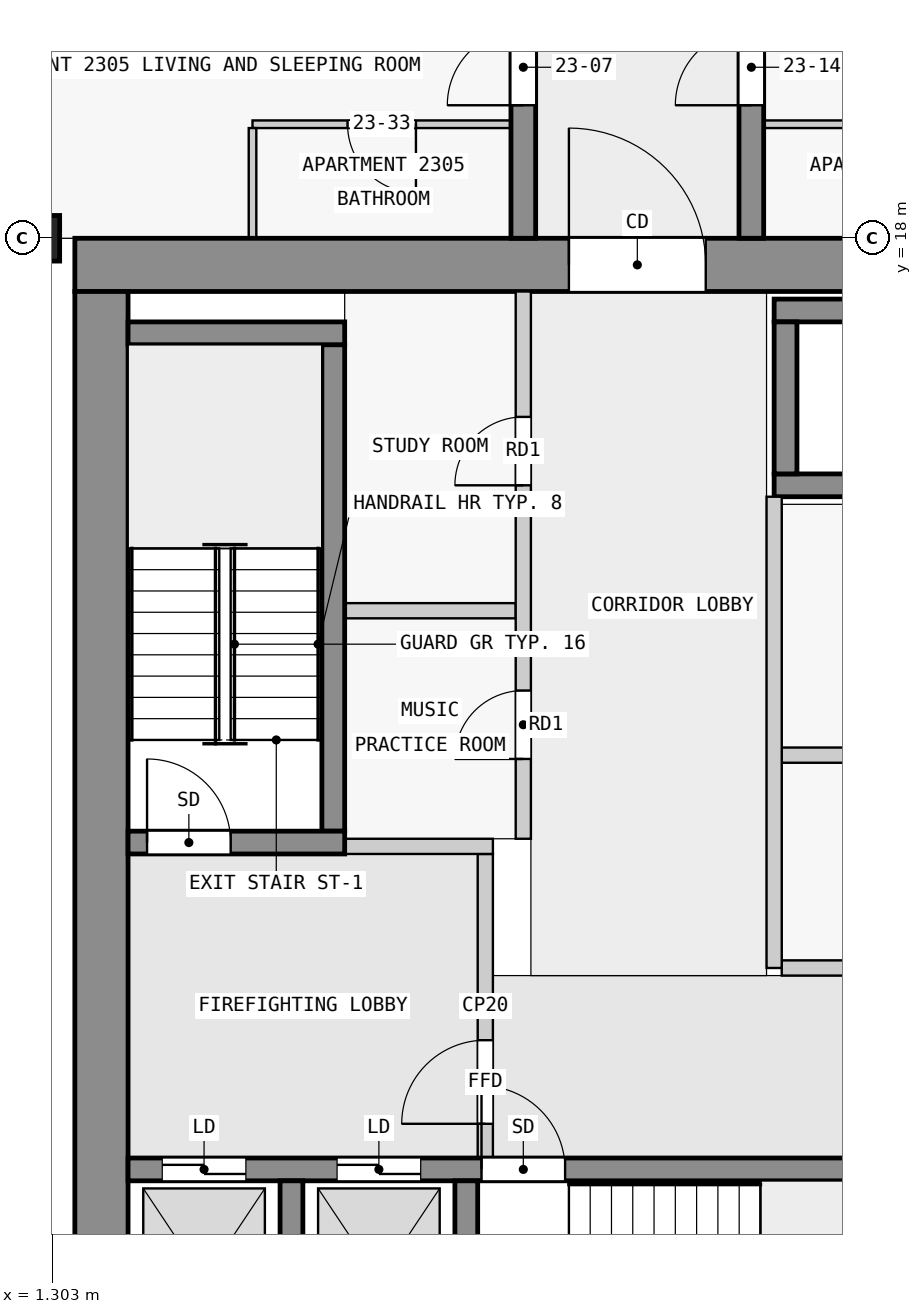
"""IFC4 building model, lengths in metres.
Left out: names, types, materials, properties, quantities, classifications, styles, units other than length and angle.
Written with IfcOpenShell. Run it as: python <this file> out.ifc"""

import sys

from ifc_helpers import new_model, si_unit, direction, frame, frame_2d, origin, origin_2d, place, context, subcontext, project, spatial, rectangle, extrude, element, fill, save


model = new_model("IFC4")
c1 = context("Model", 3, precision=1e-05, world=origin(), true_north=direction((0.0, 1.0)))
c2 = subcontext(c1, "Body", "Model", "MODEL_VIEW")
j1 = project(units=[si_unit("LENGTHUNIT", "METRE"), si_unit("PLANEANGLEUNIT", "RADIAN")], contexts=[c1])
p1 = place(None, origin())
s1 = spatial("IfcSite", under=j1, at=p1, CompositionType="ELEMENT")
p2 = place(p1, origin())
s2 = spatial("IfcBuilding", under=s1, at=p2, CompositionType="ELEMENT")
p3 = place(p2, frame((0.0, 0.0, 92.3)))
s3 = spatial("IfcBuildingStorey", under=s2, at=p3, CompositionType="ELEMENT", Elevation=92.3)
p4 = place(p3, frame((0.7, 18.0, 0.0), z_axis=(0.0, 0.0, 1.0), x_axis=(0.0, 1.0, 0.0)))
e1 = element("IfcColumn", 1, at=p4, inside=s3, PredefinedType="COLUMN", context=c2, shape_type="SweptSolid", body=[
    extrude(rectangle(XDim=0.6, YDim=1.4, at=origin_2d()), origin(), (0.0, 0.0, 1.0), 3.5),
])
p5 = place(p3, frame((1.6, 17.65, 0.0), z_axis=(0.0, 0.0, 1.0), x_axis=(1.0, 0.0, 0.0)))
e2 = element("IfcWall", 2, at=p5, inside=s3, PredefinedType="SHEAR", context=c2, shape_type="SweptSolid", body=[
    extrude(rectangle(XDim=20.9, YDim=0.7, at=frame_2d((10.45, 0.0))), origin(), (0.0, 0.0, 1.0), 3.25),
])
p6 = place(p5, frame((6.5, 0.0, 0.0)))
e3 = element("IfcOpeningElement", 3, at=p6, cuts=e2, PredefinedType="OPENING", context=c2, shape_type="SweptSolid", body=[
    extrude(rectangle(XDim=1.8, YDim=2.1, at=frame_2d((0.9, 1.05))), frame((0.0, 0.36, 0.0), z_axis=(0.0, -1.0, 0.0), x_axis=(1.0, 0.0, 0.0)), (0.0, 0.0, 1.0), 0.72),
])
p7 = place(p3, frame((1.95, 2.5, 0.0), z_axis=(0.0, 0.0, 1.0), x_axis=(0.0, 1.0, 0.0)))
e4 = element("IfcWall", 4, at=p7, inside=s3, PredefinedType="SHEAR", context=c2, shape_type="SweptSolid", body=[
    extrude(rectangle(XDim=14.8, YDim=0.7, at=frame_2d((7.4, 0.0))), origin(), (0.0, 0.0, 1.0), 3.25),
])
for number, where, z_axis, x_axis in (
    (5, (4.45, 2.8, 0.0), (0.0, 0.0, 1.0), (0.0, 1.0, 0.0)),
    (6, (6.75, 2.8, 0.0), (0.0, 0.0, 1.0), (0.0, 1.0, 0.0)),
):
    element("IfcWall", number, at=place(p3, frame(where, z_axis=z_axis, x_axis=x_axis)), inside=s3, PredefinedType="SHEAR", context=c2, shape_type="SweptSolid", body=[
        extrude(rectangle(XDim=2.8, YDim=0.3, at=frame_2d((1.4, 0.0))), origin(), (0.0, 0.0, 1.0), 3.25),
    ])
p8 = place(p3, frame((2.3, 5.75, 0.0), z_axis=(0.0, 0.0, 1.0), x_axis=(1.0, 0.0, 0.0)))
e7 = element("IfcWall", 7, at=p8, inside=s3, PredefinedType="SHEAR", context=c2, shape_type="SweptSolid", body=[
    extrude(rectangle(XDim=18.8, YDim=0.3, at=frame_2d((9.4, 0.0))), origin(), (0.0, 0.0, 1.0), 3.25),
])
p9 = place(p8, frame((4.65, 0.0, 0.0)))
e8 = element("IfcOpeningElement", 8, at=p9, cuts=e7, PredefinedType="OPENING", context=c2, shape_type="SweptSolid", body=[
    extrude(rectangle(XDim=1.1, YDim=2.1, at=frame_2d((0.55, 1.05))), frame((0.0, 0.16, 0.0), z_axis=(0.0, -1.0, 0.0), x_axis=(1.0, 0.0, 0.0)), (0.0, 0.0, 1.0), 0.32),
])
p10 = place(p8, frame((0.45, 0.0, 0.0)))
e9 = element("IfcOpeningElement", 9, at=p10, cuts=e7, PredefinedType="OPENING", context=c2, shape_type="SweptSolid", body=[
    extrude(rectangle(XDim=1.1, YDim=2.1, at=frame_2d((0.55, 1.05))), frame((0.0, 0.16, 0.0), z_axis=(0.0, -1.0, 0.0), x_axis=(1.0, 0.0, 0.0)), (0.0, 0.0, 1.0), 0.32),
])
p11 = place(p8, frame((2.75, 0.0, 0.0)))
e10 = element("IfcOpeningElement", 10, at=p11, cuts=e7, PredefinedType="OPENING", context=c2, shape_type="SweptSolid", body=[
    extrude(rectangle(XDim=1.1, YDim=2.1, at=frame_2d((0.55, 1.05))), frame((0.0, 0.16, 0.0), z_axis=(0.0, -1.0, 0.0), x_axis=(1.0, 0.0, 0.0)), (0.0, 0.0, 1.0), 0.32),
])
p12 = place(p8, frame((11.85, 0.0, 0.0)))
e11 = element("IfcOpeningElement", 11, at=p12, cuts=e7, PredefinedType="OPENING", context=c2, shape_type="SweptSolid", body=[
    extrude(rectangle(XDim=1.1, YDim=2.1, at=frame_2d((0.55, 1.05))), frame((0.0, 0.16, 0.0), z_axis=(0.0, -1.0, 0.0), x_axis=(1.0, 0.0, 0.0)), (0.0, 0.0, 1.0), 0.32),
])
p13 = place(p8, frame((14.35, 0.0, 0.0)))
e12 = element("IfcOpeningElement", 12, at=p13, cuts=e7, PredefinedType="OPENING", context=c2, shape_type="SweptSolid", body=[
    extrude(rectangle(XDim=1.1, YDim=2.1, at=frame_2d((0.55, 1.05))), frame((0.0, 0.16, 0.0), z_axis=(0.0, -1.0, 0.0), x_axis=(1.0, 0.0, 0.0)), (0.0, 0.0, 1.0), 0.32),
])
p14 = place(p8, frame((16.85, 0.0, 0.0)))
e13 = element("IfcOpeningElement", 13, at=p14, cuts=e7, PredefinedType="OPENING", context=c2, shape_type="SweptSolid", body=[
    extrude(rectangle(XDim=1.1, YDim=2.1, at=frame_2d((0.55, 1.05))), frame((0.0, 0.16, 0.0), z_axis=(0.0, -1.0, 0.0), x_axis=(1.0, 0.0, 0.0)), (0.0, 0.0, 1.0), 0.32),
])
p15 = place(p3, frame((2.3, 10.05, 0.0), z_axis=(0.0, 0.0, 1.0), x_axis=(1.0, 0.0, 0.0)))
e14 = element("IfcWall", 14, at=p15, inside=s3, PredefinedType="SHEAR", context=c2, shape_type="SweptSolid", body=[
    extrude(rectangle(XDim=2.85, YDim=0.3, at=frame_2d((1.425, 0.0))), origin(), (0.0, 0.0, 1.0), 3.25),
])
p16 = place(p15, frame((0.25, 0.0, 0.0)))
e15 = element("IfcOpeningElement", 15, at=p16, cuts=e14, PredefinedType="OPENING", context=c2, shape_type="SweptSolid", body=[
    extrude(rectangle(XDim=1.1, YDim=2.1, at=frame_2d((0.55, 1.05))), frame((0.0, 0.16, 0.0), z_axis=(0.0, -1.0, 0.0), x_axis=(1.0, 0.0, 0.0)), (0.0, 0.0, 1.0), 0.32),
])
p17 = place(p3, frame((5.0, 10.2, 0.0), z_axis=(0.0, 0.0, 1.0), x_axis=(0.0, 1.0, 0.0)))
e16 = element("IfcWall", 16, at=p17, inside=s3, PredefinedType="SHEAR", context=c2, shape_type="SweptSolid", body=[
    extrude(rectangle(XDim=6.4, YDim=0.3, at=frame_2d((3.2, 0.0))), origin(), (0.0, 0.0, 1.0), 3.25),
])
p18 = place(p3, frame((2.3, 16.75, 0.0), z_axis=(0.0, 0.0, 1.0), x_axis=(1.0, 0.0, 0.0)))
e17 = element("IfcWall", 17, at=p18, inside=s3, PredefinedType="SHEAR", context=c2, shape_type="SweptSolid", body=[
    extrude(rectangle(XDim=2.85, YDim=0.3, at=frame_2d((1.425, 0.0))), origin(), (0.0, 0.0, 1.0), 3.25),
])
for number, where, z_axis, x_axis in (
    (18, (10.8, 17.05, 0.0), (0.0, 0.0, 1.0), (1.0, 0.0, 0.0)),
    (19, (10.8, 14.75, 0.0), (0.0, 0.0, 1.0), (1.0, 0.0, 0.0)),
):
    element("IfcWall", number, at=place(p3, frame(where, z_axis=z_axis, x_axis=x_axis)), inside=s3, PredefinedType="SHEAR", context=c2, shape_type="SweptSolid", body=[
        extrude(rectangle(XDim=7.8, YDim=0.3, at=frame_2d((3.9, 0.0))), origin(), (0.0, 0.0, 1.0), 3.25),
    ])
p19 = place(p3, frame((10.95, 14.9, 0.0), z_axis=(0.0, 0.0, 1.0), x_axis=(0.0, 1.0, 0.0)))
e20 = element("IfcWall", 20, at=p19, inside=s3, PredefinedType="SHEAR", context=c2, shape_type="SweptSolid", body=[
    extrude(rectangle(XDim=2.0, YDim=0.3, at=frame_2d((1.0, 0.0))), origin(), (0.0, 0.0, 1.0), 3.25),
])
p20 = place(p3, frame((7.5, 18.0, 0.0), z_axis=(0.0, 0.0, 1.0), x_axis=(0.0, 1.0, 0.0)))
e21 = element("IfcWall", 21, at=p20, inside=s3, PredefinedType="SHEAR", context=c2, shape_type="SweptSolid", body=[
    extrude(rectangle(XDim=27.0, YDim=0.325, at=frame_2d((13.5, 0.0))), origin(), (0.0, 0.0, 1.0), 3.25),
])
p21 = place(p20, frame((1.75, 0.0, 0.0)))
e22 = element("IfcOpeningElement", 22, at=p21, cuts=e21, PredefinedType="OPENING", context=c2, shape_type="SweptSolid", body=[
    extrude(rectangle(XDim=1.0, YDim=2.1, at=frame_2d((0.5, 1.05))), frame((0.0, 0.172, 0.0), z_axis=(0.0, -1.0, 0.0), x_axis=(1.0, 0.0, 0.0)), (0.0, 0.0, 1.0), 0.345),
])
p22 = place(p20, frame((6.25, 0.0, 0.0)))
e23 = element("IfcOpeningElement", 23, at=p22, cuts=e21, PredefinedType="OPENING", context=c2, shape_type="SweptSolid", body=[
    extrude(rectangle(XDim=1.0, YDim=2.1, at=frame_2d((0.5, 1.05))), frame((0.0, 0.172, 0.0), z_axis=(0.0, -1.0, 0.0), x_axis=(1.0, 0.0, 0.0)), (0.0, 0.0, 1.0), 0.345),
])
p23 = place(p20, frame((10.85, 0.0, 0.0)))
e24 = element("IfcOpeningElement", 24, at=p23, cuts=e21, PredefinedType="OPENING", context=c2, shape_type="SweptSolid", body=[
    extrude(rectangle(XDim=0.9, YDim=2.1, at=frame_2d((0.45, 1.05))), frame((0.0, 0.172, 0.0), z_axis=(0.0, -1.0, 0.0), x_axis=(1.0, 0.0, 0.0)), (0.0, 0.0, 1.0), 0.345),
])
p24 = place(p20, frame((15.25, 0.0, 0.0)))
e25 = element("IfcOpeningElement", 25, at=p24, cuts=e21, PredefinedType="OPENING", context=c2, shape_type="SweptSolid", body=[
    extrude(rectangle(XDim=1.0, YDim=2.1, at=frame_2d((0.5, 1.05))), frame((0.0, 0.172, 0.0), z_axis=(0.0, -1.0, 0.0), x_axis=(1.0, 0.0, 0.0)), (0.0, 0.0, 1.0), 0.345),
])
p25 = place(p20, frame((19.85, 0.0, 0.0)))
e26 = element("IfcOpeningElement", 26, at=p25, cuts=e21, PredefinedType="OPENING", context=c2, shape_type="SweptSolid", body=[
    extrude(rectangle(XDim=0.9, YDim=2.1, at=frame_2d((0.45, 1.05))), frame((0.0, 0.172, 0.0), z_axis=(0.0, -1.0, 0.0), x_axis=(1.0, 0.0, 0.0)), (0.0, 0.0, 1.0), 0.345),
])
p26 = place(p20, frame((23.25, 0.0, 0.0)))
e27 = element("IfcOpeningElement", 27, at=p26, cuts=e21, PredefinedType="OPENING", context=c2, shape_type="SweptSolid", body=[
    extrude(rectangle(XDim=0.9, YDim=2.1, at=frame_2d((0.45, 1.05))), frame((0.0, 0.172, 0.0), z_axis=(0.0, -1.0, 0.0), x_axis=(1.0, 0.0, 0.0)), (0.0, 0.0, 1.0), 0.345),
])
p27 = place(p20, frame((25.45, 0.0, 0.0)))
e28 = element("IfcOpeningElement", 28, at=p27, cuts=e21, PredefinedType="OPENING", context=c2, shape_type="SweptSolid", body=[
    extrude(rectangle(XDim=1.0, YDim=2.1, at=frame_2d((0.5, 1.05))), frame((0.0, 0.172, 0.0), z_axis=(0.0, -1.0, 0.0), x_axis=(1.0, 0.0, 0.0)), (0.0, 0.0, 1.0), 0.345),
])
p28 = place(p3, frame((10.5, 18.0, 0.0), z_axis=(0.0, 0.0, 1.0), x_axis=(0.0, 1.0, 0.0)))
e29 = element("IfcWall", 29, at=p28, inside=s3, PredefinedType="SHEAR", context=c2, shape_type="SweptSolid", body=[
    extrude(rectangle(XDim=27.0, YDim=0.325, at=frame_2d((13.5, 0.0))), origin(), (0.0, 0.0, 1.0), 3.25),
])
p29 = place(p28, frame((1.75, 0.0, 0.0)))
e30 = element("IfcOpeningElement", 30, at=p29, cuts=e29, PredefinedType="OPENING", context=c2, shape_type="SweptSolid", body=[
    extrude(rectangle(XDim=1.0, YDim=2.1, at=frame_2d((0.5, 1.05))), frame((0.0, 0.172, 0.0), z_axis=(0.0, -1.0, 0.0), x_axis=(1.0, 0.0, 0.0)), (0.0, 0.0, 1.0), 0.345),
])
p30 = place(p28, frame((6.25, 0.0, 0.0)))
e31 = element("IfcOpeningElement", 31, at=p30, cuts=e29, PredefinedType="OPENING", context=c2, shape_type="SweptSolid", body=[
    extrude(rectangle(XDim=1.0, YDim=2.1, at=frame_2d((0.5, 1.05))), frame((0.0, 0.172, 0.0), z_axis=(0.0, -1.0, 0.0), x_axis=(1.0, 0.0, 0.0)), (0.0, 0.0, 1.0), 0.345),
])
p31 = place(p28, frame((13.05, 0.0, 0.0)))
e32 = element("IfcOpeningElement", 32, at=p31, cuts=e29, PredefinedType="OPENING", context=c2, shape_type="SweptSolid", body=[
    extrude(rectangle(XDim=1.0, YDim=2.1, at=frame_2d((0.5, 1.05))), frame((0.0, 0.172, 0.0), z_axis=(0.0, -1.0, 0.0), x_axis=(1.0, 0.0, 0.0)), (0.0, 0.0, 1.0), 0.345),
])
p32 = place(p28, frame((21.35, 0.0, 0.0)))
e33 = element("IfcOpeningElement", 33, at=p32, cuts=e29, PredefinedType="OPENING", context=c2, shape_type="SweptSolid", body=[
    extrude(rectangle(XDim=1.0, YDim=2.1, at=frame_2d((0.5, 1.05))), frame((0.0, 0.172, 0.0), z_axis=(0.0, -1.0, 0.0), x_axis=(1.0, 0.0, 0.0)), (0.0, 0.0, 1.0), 0.345),
])
p33 = place(p3, frame((7.0, 5.9, 0.0), z_axis=(0.0, 0.0, 1.0), x_axis=(0.0, 1.0, 0.0)))
e34 = element("IfcWall", 34, at=p33, inside=s3, PredefinedType="PARTITIONING", context=c2, shape_type="SweptSolid", body=[
    extrude(rectangle(XDim=4.0, YDim=0.2, at=frame_2d((2.0, 0.0))), origin(), (0.0, 0.0, 1.0), 3.25),
])
p34 = place(p33, frame((0.45, 0.0, 0.0)))
e35 = element("IfcOpeningElement", 35, at=p34, cuts=e34, PredefinedType="OPENING", context=c2, shape_type="SweptSolid", body=[
    extrude(rectangle(XDim=1.1, YDim=2.1, at=frame_2d((0.55, 1.05))), frame((0.0, 0.11, 0.0), z_axis=(0.0, -1.0, 0.0), x_axis=(1.0, 0.0, 0.0)), (0.0, 0.0, 1.0), 0.22),
])
p35 = place(p3, frame((5.15, 10.0, 0.0), z_axis=(0.0, 0.0, 1.0), x_axis=(1.0, 0.0, 0.0)))
e36 = element("IfcWall", 36, at=p35, inside=s3, PredefinedType="PARTITIONING", context=c2, shape_type="SweptSolid", body=[
    extrude(rectangle(XDim=1.95, YDim=0.2, at=frame_2d((0.975, 0.0))), origin(), (0.0, 0.0, 1.0), 3.25),
])
p36 = place(p3, frame((10.8, 8.4, 0.0), z_axis=(0.0, 0.0, 1.0), x_axis=(0.0, 1.0, 0.0)))
e37 = element("IfcWall", 37, at=p36, inside=s3, PredefinedType="PARTITIONING", context=c2, shape_type="SweptSolid", body=[
    extrude(rectangle(XDim=6.2, YDim=0.2, at=frame_2d((3.1, 0.0))), origin(), (0.0, 0.0, 1.0), 3.25),
])
for number, where, z_axis, x_axis in (
    (38, (10.9, 8.4, 0.0), (0.0, 0.0, 1.0), (1.0, 0.0, 0.0)),
    (39, (10.9, 11.2, 0.0), (0.0, 0.0, 1.0), (1.0, 0.0, 0.0)),
):
    element("IfcWall", number, at=place(p3, frame(where, z_axis=z_axis, x_axis=x_axis)), inside=s3, PredefinedType="PARTITIONING", context=c2, shape_type="SweptSolid", body=[
        extrude(rectangle(XDim=7.4, YDim=0.2, at=frame_2d((3.7, 0.0))), origin(), (0.0, 0.0, 1.0), 3.25),
    ])
p37 = place(p3, frame((7.5, 10.1, 0.0), z_axis=(0.0, 0.0, 1.0), x_axis=(0.0, 1.0, 0.0)))
e40 = element("IfcWall", 40, at=p37, inside=s3, PredefinedType="PARTITIONING", context=c2, shape_type="SweptSolid", body=[
    extrude(rectangle(XDim=7.2, YDim=0.2, at=frame_2d((3.6, 0.0))), origin(), (0.0, 0.0, 1.0), 3.25),
])
p38 = place(p37, frame((1.05, 0.0, 0.0)))
e41 = element("IfcOpeningElement", 41, at=p38, cuts=e40, PredefinedType="OPENING", context=c2, shape_type="SweptSolid", body=[
    extrude(rectangle(XDim=0.9, YDim=2.1, at=frame_2d((0.45, 1.05))), frame((0.0, 0.11, 0.0), z_axis=(0.0, -1.0, 0.0), x_axis=(1.0, 0.0, 0.0)), (0.0, 0.0, 1.0), 0.22),
])
p39 = place(p37, frame((4.65, 0.0, 0.0)))
e42 = element("IfcOpeningElement", 42, at=p39, cuts=e40, PredefinedType="OPENING", context=c2, shape_type="SweptSolid", body=[
    extrude(rectangle(XDim=0.9, YDim=2.1, at=frame_2d((0.45, 1.05))), frame((0.0, 0.11, 0.0), z_axis=(0.0, -1.0, 0.0), x_axis=(1.0, 0.0, 0.0)), (0.0, 0.0, 1.0), 0.22),
])
p40 = place(p3, frame((5.15, 13.1, 0.0), z_axis=(0.0, 0.0, 1.0), x_axis=(1.0, 0.0, 0.0)))
e43 = element("IfcWall", 43, at=p40, inside=s3, PredefinedType="PARTITIONING", context=c2, shape_type="SweptSolid", body=[
    extrude(rectangle(XDim=2.25, YDim=0.2, at=frame_2d((1.125, 0.0))), origin(), (0.0, 0.0, 1.0), 3.25),
])
p41 = place(p3, frame((7.337, 19.5, 0.0), z_axis=(0.0, 0.0, 1.0), x_axis=(-1.0, 0.0, 0.0)))
e44 = element("IfcWall", 44, at=p41, inside=s3, PredefinedType="PARTITIONING", context=c2, shape_type="SweptSolid", body=[
    extrude(rectangle(XDim=3.4, YDim=0.1, at=frame_2d((1.7, 0.0))), origin(), (0.0, 0.0, 1.0), 3.25),
])
p42 = place(p41, frame((1.25, 0.0, 0.0)))
e45 = element("IfcOpeningElement", 45, at=p42, cuts=e44, PredefinedType="OPENING", context=c2, shape_type="SweptSolid", body=[
    extrude(rectangle(XDim=0.9, YDim=2.1, at=frame_2d((0.45, 1.05))), frame((0.0, 0.06, 0.0), z_axis=(0.0, -1.0, 0.0), x_axis=(1.0, 0.0, 0.0)), (0.0, 0.0, 1.0), 0.12),
])
p43 = place(p3, frame((14.062, 19.5, 0.0), z_axis=(0.0, 0.0, 1.0), x_axis=(-1.0, 0.0, 0.0)))
e46 = element("IfcWall", 46, at=p43, inside=s3, PredefinedType="PARTITIONING", context=c2, shape_type="SweptSolid", body=[
    extrude(rectangle(XDim=3.4, YDim=0.1, at=frame_2d((1.7, 0.0))), origin(), (0.0, 0.0, 1.0), 3.25),
])
p44 = place(p43, frame((1.25, 0.0, 0.0)))
e47 = element("IfcOpeningElement", 47, at=p44, cuts=e46, PredefinedType="OPENING", context=c2, shape_type="SweptSolid", body=[
    extrude(rectangle(XDim=0.9, YDim=2.1, at=frame_2d((0.45, 1.05))), frame((0.0, 0.06, 0.0), z_axis=(0.0, -1.0, 0.0), x_axis=(1.0, 0.0, 0.0)), (0.0, 0.0, 1.0), 0.12),
])
p45 = place(p3, frame((3.938, 19.45, 0.0), z_axis=(0.0, 0.0, 1.0), x_axis=(0.0, -1.0, 0.0)))
e48 = element("IfcWall", 48, at=p45, inside=s3, PredefinedType="PARTITIONING", context=c2, shape_type="SweptSolid", body=[
    extrude(rectangle(XDim=1.45, YDim=0.1, at=frame_2d((0.725, 0.0))), origin(), (0.0, 0.0, 1.0), 3.25),
])
p46 = place(p34, origin())
e49 = element("IfcDoor", 49, at=p46, inside=s3, OperationType="SINGLE_SWING_LEFT", PredefinedType="DOOR", context=c2, shape_type="SweptSolid", body=[
    extrude(rectangle(XDim=1.1, YDim=2.1, at=frame_2d((0.55, 1.05))), frame((0.0, 0.025, 0.0), z_axis=(0.0, -1.0, 0.0), x_axis=(1.0, 0.0, 0.0)), (0.0, 0.0, 1.0), 0.05),
])
fill(e35, e49)
p47 = place(p16, origin())
e50 = element("IfcDoor", 50, at=p47, inside=s3, OperationType="SINGLE_SWING_RIGHT", PredefinedType="DOOR", context=c2, shape_type="SweptSolid", body=[
    extrude(rectangle(XDim=1.1, YDim=2.1, at=frame_2d((0.55, 1.05))), frame((0.0, 0.025, 0.0), z_axis=(0.0, -1.0, 0.0), x_axis=(1.0, 0.0, 0.0)), (0.0, 0.0, 1.0), 0.05),
])
fill(e15, e50)
p48 = place(p9, origin())
e51 = element("IfcDoor", 51, at=p48, inside=s3, OperationType="SINGLE_SWING_LEFT", PredefinedType="DOOR", context=c2, shape_type="SweptSolid", body=[
    extrude(rectangle(XDim=1.1, YDim=2.1, at=frame_2d((0.55, 1.05))), frame((0.0, 0.025, 0.0), z_axis=(0.0, -1.0, 0.0), x_axis=(1.0, 0.0, 0.0)), (0.0, 0.0, 1.0), 0.05),
])
fill(e8, e51)
p49 = place(p10, origin())
e52 = element("IfcDoor", 52, at=p49, inside=s3, OperationType="DOUBLE_DOOR_SLIDING", PredefinedType="DOOR", context=c2, shape_type="SweptSolid", body=[
    extrude(rectangle(XDim=1.1, YDim=2.1, at=frame_2d((0.55, 1.05))), frame((0.0, 0.025, 0.0), z_axis=(0.0, -1.0, 0.0), x_axis=(1.0, 0.0, 0.0)), (0.0, 0.0, 1.0), 0.05),
])
fill(e9, e52)
p50 = place(p11, origin())
e53 = element("IfcDoor", 53, at=p50, inside=s3, OperationType="DOUBLE_DOOR_SLIDING", PredefinedType="DOOR", context=c2, shape_type="SweptSolid", body=[
    extrude(rectangle(XDim=1.1, YDim=2.1, at=frame_2d((0.55, 1.05))), frame((0.0, 0.025, 0.0), z_axis=(0.0, -1.0, 0.0), x_axis=(1.0, 0.0, 0.0)), (0.0, 0.0, 1.0), 0.05),
])
fill(e10, e53)
p51 = place(p6, origin())
e54 = element("IfcDoor", 54, at=p51, inside=s3, OperationType="DOUBLE_DOOR_SINGLE_SWING", PredefinedType="DOOR", context=c2, shape_type="SweptSolid", body=[
    extrude(rectangle(XDim=1.8, YDim=2.1, at=frame_2d((0.9, 1.05))), frame((0.0, 0.025, 0.0), z_axis=(0.0, -1.0, 0.0), x_axis=(1.0, 0.0, 0.0)), (0.0, 0.0, 1.0), 0.05),
])
fill(e3, e54)
p52 = place(p38, origin())
e55 = element("IfcDoor", 55, at=p52, inside=s3, OperationType="SINGLE_SWING_RIGHT", PredefinedType="DOOR", context=c2, shape_type="SweptSolid", body=[
    extrude(rectangle(XDim=0.9, YDim=2.1, at=frame_2d((0.45, 1.05))), frame((0.0, 0.025, 0.0), z_axis=(0.0, -1.0, 0.0), x_axis=(1.0, 0.0, 0.0)), (0.0, 0.0, 1.0), 0.05),
])
fill(e41, e55)
p53 = place(p39, origin())
e56 = element("IfcDoor", 56, at=p53, inside=s3, OperationType="SINGLE_SWING_RIGHT", PredefinedType="DOOR", context=c2, shape_type="SweptSolid", body=[
    extrude(rectangle(XDim=0.9, YDim=2.1, at=frame_2d((0.45, 1.05))), frame((0.0, 0.025, 0.0), z_axis=(0.0, -1.0, 0.0), x_axis=(1.0, 0.0, 0.0)), (0.0, 0.0, 1.0), 0.05),
])
fill(e42, e56)
p54 = place(p21, origin())
e57 = element("IfcDoor", 57, at=p54, inside=s3, OperationType="SINGLE_SWING_LEFT", PredefinedType="DOOR", context=c2, shape_type="SweptSolid", body=[
    extrude(rectangle(XDim=1.0, YDim=2.1, at=frame_2d((0.5, 1.05))), frame((0.0, 0.025, 0.0), z_axis=(0.0, -1.0, 0.0), x_axis=(1.0, 0.0, 0.0)), (0.0, 0.0, 1.0), 0.05),
])
fill(e22, e57)
p55 = place(p29, origin())
e58 = element("IfcDoor", 58, at=p55, inside=s3, OperationType="SINGLE_SWING_LEFT", PredefinedType="DOOR", context=c2, shape_type="SweptSolid", body=[
    extrude(rectangle(XDim=1.0, YDim=2.1, at=frame_2d((0.5, 1.05))), frame((0.0, 0.025, 0.0), z_axis=(0.0, -1.0, 0.0), x_axis=(1.0, 0.0, 0.0)), (0.0, 0.0, 1.0), 0.05),
])
fill(e30, e58)
p56 = place(p42, origin())
e59 = element("IfcDoor", 59, at=p56, inside=s3, OperationType="SINGLE_SWING_LEFT", PredefinedType="DOOR", context=c2, shape_type="SweptSolid", body=[
    extrude(rectangle(XDim=0.9, YDim=2.1, at=frame_2d((0.45, 1.05))), frame((0.0, 0.025, 0.0), z_axis=(0.0, -1.0, 0.0), x_axis=(1.0, 0.0, 0.0)), (0.0, 0.0, 1.0), 0.05),
])
fill(e45, e59)
save(model, sys.argv[1])
